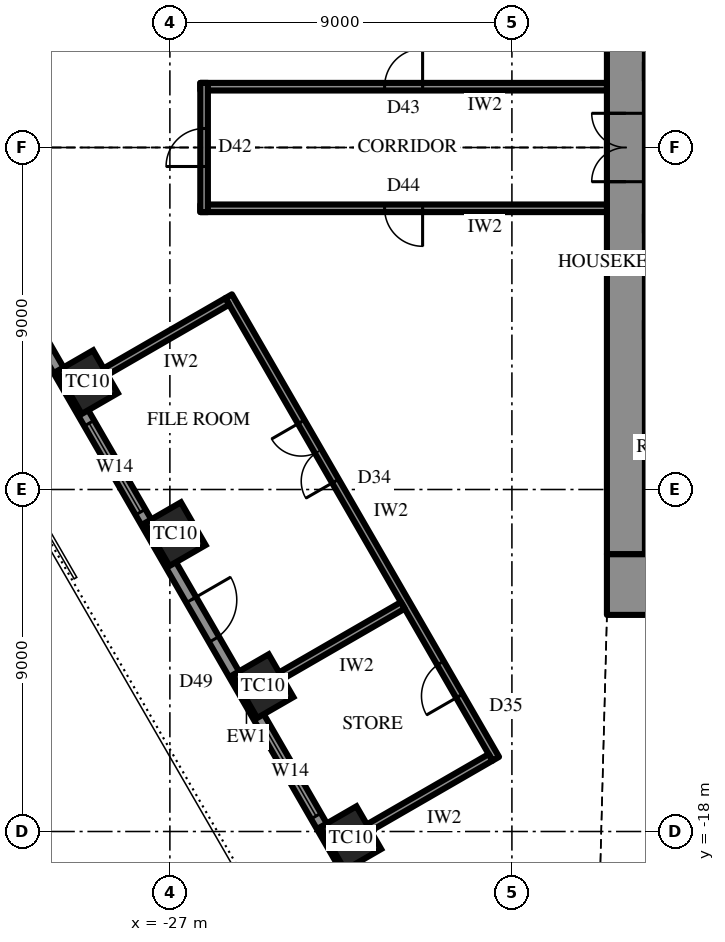
"""IFC4 building model, lengths in metres.
Left out: names, types, materials, properties, quantities, classifications, styles, units other than length and angle.
Written with IfcOpenShell. Run it as: python <this file> out.ifc"""

import sys

from ifc_helpers import new_model, si_unit, direction, frame, frame_2d, origin, origin_2d, place, context, subcontext, project, spatial, rectangle, extrude, element, fill, save


model = new_model("IFC4")
c1 = context("Model", 3, precision=1e-05, world=origin(), true_north=direction((0.0, 1.0)))
c2 = subcontext(c1, "Body", "Model", "MODEL_VIEW")
j1 = project(units=[si_unit("LENGTHUNIT", "METRE"), si_unit("PLANEANGLEUNIT", "RADIAN")], contexts=[c1])
p1 = place(None, origin())
s1 = spatial("IfcSite", under=j1, at=p1, CompositionType="ELEMENT")
p2 = place(p1, origin())
s2 = spatial("IfcBuilding", under=s1, at=p2, CompositionType="ELEMENT")
p3 = place(p2, frame((0.0, 0.0, 244.9)))
s3 = spatial("IfcBuildingStorey", under=s2, at=p3, CompositionType="ELEMENT", Elevation=244.9)
for number, where, z_axis, x_axis in (
    (1, (-29.171, -6.175, 0.0), (0.0, 0.0, 1.0), (0.5, -0.866, 0.0)),
    (2, (-26.861, -10.175, 0.0), (0.0, 0.0, 1.0), (0.5, -0.866, 0.0)),
    (3, (-24.552, -14.175, 0.0), (0.0, 0.0, 1.0), (0.5, -0.866, 0.0)),
    (4, (-22.242, -18.175, 0.0), (0.0, 0.0, 1.0), (0.5, -0.866, 0.0)),
):
    element("IfcColumn", number, at=place(p3, frame(where, z_axis=z_axis, x_axis=x_axis)), inside=s3, PredefinedType="COLUMN", context=c2, shape_type="SweptSolid", body=[
        extrude(rectangle(XDim=1.3, YDim=1.1, at=origin_2d()), origin(), (0.0, 0.0, 1.0), 4.2),
    ])
p4 = place(p3, frame((15.5, -11.5, 0.0), z_axis=(0.0, 0.0, 1.0), x_axis=(-1.0, 0.0, 0.0)))
e5 = element("IfcWall", 5, at=p4, inside=s3, PredefinedType="SHEAR", context=c2, shape_type="SweptSolid", body=[
    extrude(rectangle(XDim=31.0, YDim=1.6, at=frame_2d((15.5, 0.0))), origin(), (0.0, 0.0, 1.0), 4.2),
])
p5 = place(p4, frame((16.35, 0.0, 0.0)))
e6 = element("IfcOpeningElement", 6, at=p5, cuts=e5, PredefinedType="OPENING", context=c2, shape_type="SweptSolid", body=[
    extrude(rectangle(XDim=0.9, YDim=2.2, at=frame_2d((0.45, 1.1))), frame((0.0, 0.81, 0.0), z_axis=(0.0, -1.0, 0.0), x_axis=(1.0, 0.0, 0.0)), (0.0, 0.0, 1.0), 1.62),
])
p6 = place(p4, frame((19.35, 0.0, 0.0)))
e7 = element("IfcOpeningElement", 7, at=p6, cuts=e5, PredefinedType="OPENING", context=c2, shape_type="SweptSolid", body=[
    extrude(rectangle(XDim=0.9, YDim=2.2, at=frame_2d((0.45, 1.1))), frame((0.0, 0.81, 0.0), z_axis=(0.0, -1.0, 0.0), x_axis=(1.0, 0.0, 0.0)), (0.0, 0.0, 1.0), 1.62),
])
p7 = place(p4, frame((22.4, 0.0, 0.0)))
e8 = element("IfcOpeningElement", 8, at=p7, cuts=e5, PredefinedType="OPENING", context=c2, shape_type="SweptSolid", body=[
    extrude(rectangle(XDim=1.0, YDim=2.2, at=frame_2d((0.5, 1.1))), frame((0.0, 0.81, 0.0), z_axis=(0.0, -1.0, 0.0), x_axis=(1.0, 0.0, 0.0)), (0.0, 0.0, 1.0), 1.62),
])
p8 = place(p4, frame((1.65, 0.0, 0.0)))
e9 = element("IfcOpeningElement", 9, at=p8, cuts=e5, PredefinedType="OPENING", context=c2, shape_type="SweptSolid", body=[
    extrude(rectangle(XDim=0.9, YDim=2.2, at=frame_2d((0.45, 1.1))), frame((0.0, 0.81, 0.0), z_axis=(0.0, -1.0, 0.0), x_axis=(1.0, 0.0, 0.0)), (0.0, 0.0, 1.0), 1.62),
])
p9 = place(p4, frame((4.65, 0.0, 0.0)))
e10 = element("IfcOpeningElement", 10, at=p9, cuts=e5, PredefinedType="OPENING", context=c2, shape_type="SweptSolid", body=[
    extrude(rectangle(XDim=0.9, YDim=2.2, at=frame_2d((0.45, 1.1))), frame((0.0, 0.81, 0.0), z_axis=(0.0, -1.0, 0.0), x_axis=(1.0, 0.0, 0.0)), (0.0, 0.0, 1.0), 1.62),
])
p10 = place(p4, frame((25.45, 0.0, 0.0)))
e11 = element("IfcOpeningElement", 11, at=p10, cuts=e5, PredefinedType="OPENING", context=c2, shape_type="SweptSolid", body=[
    extrude(rectangle(XDim=0.9, YDim=2.2, at=frame_2d((0.45, 1.1))), frame((0.0, 0.81, 0.0), z_axis=(0.0, -1.0, 0.0), x_axis=(1.0, 0.0, 0.0)), (0.0, 0.0, 1.0), 1.62),
])
p11 = place(p4, frame((28.45, 0.0, 0.0)))
e12 = element("IfcOpeningElement", 12, at=p11, cuts=e5, PredefinedType="OPENING", context=c2, shape_type="SweptSolid", body=[
    extrude(rectangle(XDim=0.9, YDim=2.2, at=frame_2d((0.45, 1.1))), frame((0.0, 0.81, 0.0), z_axis=(0.0, -1.0, 0.0), x_axis=(1.0, 0.0, 0.0)), (0.0, 0.0, 1.0), 1.62),
])
p12 = place(p3, frame((-15.0, 10.7, 0.0), z_axis=(0.0, 0.0, 1.0), x_axis=(0.0, -1.0, 0.0)))
e13 = element("IfcWall", 13, at=p12, inside=s3, PredefinedType="SHEAR", context=c2, shape_type="SweptSolid", body=[
    extrude(rectangle(XDim=21.4, YDim=1.0, at=frame_2d((10.7, 0.0))), origin(), (0.0, 0.0, 1.0), 4.2),
])
p13 = place(p12, frame((9.8, 0.0, 0.0)))
e14 = element("IfcOpeningElement", 14, at=p13, cuts=e13, PredefinedType="OPENING", context=c2, shape_type="SweptSolid", body=[
    extrude(rectangle(XDim=1.8, YDim=2.4, at=frame_2d((0.9, 1.2))), frame((0.0, 0.51, 0.0), z_axis=(0.0, -1.0, 0.0), x_axis=(1.0, 0.0, 0.0)), (0.0, 0.0, 1.0), 1.02),
])
p14 = place(p3, frame((-12.3, -2.0, 0.0), z_axis=(0.0, 0.0, 1.0), x_axis=(-1.0, 0.0, 0.0)))
e15 = element("IfcWall", 15, at=p14, inside=s3, PredefinedType="SHEAR", context=c2, shape_type="SweptSolid", body=[
    extrude(rectangle(XDim=2.2, YDim=0.5, at=frame_2d((1.1, 0.0))), origin(), (0.0, 0.0, 1.0), 4.2),
])
p15 = place(p14, frame((0.8, 0.0, 0.0)))
e16 = element("IfcOpeningElement", 16, at=p15, cuts=e15, PredefinedType="OPENING", context=c2, shape_type="SweptSolid", body=[
    extrude(rectangle(XDim=0.9, YDim=2.2, at=frame_2d((0.45, 1.1))), frame((0.0, 0.26, 0.0), z_axis=(0.0, -1.0, 0.0), x_axis=(1.0, 0.0, 0.0)), (0.0, 0.0, 1.0), 0.52),
])
p16 = place(p3, frame((-12.3, -4.8, 0.0), z_axis=(0.0, 0.0, 1.0), x_axis=(-1.0, 0.0, 0.0)))
e17 = element("IfcWall", 17, at=p16, inside=s3, PredefinedType="SHEAR", context=c2, shape_type="SweptSolid", body=[
    extrude(rectangle(XDim=2.2, YDim=0.5, at=frame_2d((1.1, 0.0))), origin(), (0.0, 0.0, 1.0), 4.2),
])
p17 = place(p3, frame((-31.263, -3.551, 0.0), z_axis=(0.0, 0.0, 1.0), x_axis=(0.500000442367, -0.866025148383, 0.0)))
e18 = element("IfcWall", 18, at=p17, inside=s3, PredefinedType="SOLIDWALL", context=c2, shape_type="SweptSolid", body=[
    extrude(rectangle(XDim=25.113, YDim=0.3, at=frame_2d((12.556, 0.0))), origin(), (0.0, 0.0, 1.0), 2.8),
])
p18 = place(p17, frame((4.278, 0.0, 0.6)))
e19 = element("IfcOpeningElement", 19, at=p18, cuts=e18, PredefinedType="OPENING", context=c2, shape_type="SweptSolid", body=[
    extrude(rectangle(XDim=2.7, YDim=1.95, at=frame_2d((1.35, 0.975))), frame((0.0, 0.16, 0.0), z_axis=(0.0, -1.0, 0.0), x_axis=(1.0, 0.0, 0.0)), (0.0, 0.0, 1.0), 0.32),
])
p19 = place(p17, frame((9.647, 0.0, 0.0)))
e20 = element("IfcOpeningElement", 20, at=p19, cuts=e18, PredefinedType="OPENING", context=c2, shape_type="SweptSolid", body=[
    extrude(rectangle(XDim=1.2, YDim=2.4, at=frame_2d((0.6, 1.2))), frame((0.0, 0.16, 0.0), z_axis=(0.0, -1.0, 0.0), x_axis=(1.0, 0.0, 0.0)), (0.0, 0.0, 1.0), 0.32),
])
p20 = place(p17, frame((13.516, 0.0, 0.6)))
e21 = element("IfcOpeningElement", 21, at=p20, cuts=e18, PredefinedType="OPENING", context=c2, shape_type="SweptSolid", body=[
    extrude(rectangle(XDim=2.7, YDim=1.95, at=frame_2d((1.35, 0.975))), frame((0.0, 0.16, 0.0), z_axis=(0.0, -1.0, 0.0), x_axis=(1.0, 0.0, 0.0)), (0.0, 0.0, 1.0), 0.32),
])
p21 = place(p17, frame((18.135, 0.0, 0.6)))
e22 = element("IfcOpeningElement", 22, at=p21, cuts=e18, PredefinedType="OPENING", context=c2, shape_type="SweptSolid", body=[
    extrude(rectangle(XDim=2.7, YDim=1.95, at=frame_2d((1.35, 0.975))), frame((0.0, 0.16, 0.0), z_axis=(0.0, -1.0, 0.0), x_axis=(1.0, 0.0, 0.0)), (0.0, 0.0, 1.0), 0.32),
])
p22 = place(p3, frame((-25.453, -3.913, 0.0), z_axis=(0.0, 0.0, 1.0), x_axis=(0.499989069193, -0.866031714597, 0.0)))
e23 = element("IfcWall", 23, at=p22, inside=s3, PredefinedType="PARTITIONING", context=c2, shape_type="SweptSolid", body=[
    extrude(rectangle(XDim=14.056, YDim=0.2, at=frame_2d((7.028, 0.0))), origin(), (0.0, 0.0, 1.0), 4.0),
])
p23 = place(p22, frame((3.819, 0.0, 0.0)))
e24 = element("IfcOpeningElement", 24, at=p23, cuts=e23, PredefinedType="OPENING", context=c2, shape_type="SweptSolid", body=[
    extrude(rectangle(XDim=1.8, YDim=2.4, at=frame_2d((0.9, 1.2))), frame((0.0, 0.11, 0.0), z_axis=(0.0, -1.0, 0.0), x_axis=(1.0, 0.0, 0.0)), (0.0, 0.0, 1.0), 0.22),
])
p24 = place(p22, frame((11.147, 0.0, 0.0)))
e25 = element("IfcOpeningElement", 25, at=p24, cuts=e23, PredefinedType="OPENING", context=c2, shape_type="SweptSolid", body=[
    extrude(rectangle(XDim=1.0, YDim=2.2, at=frame_2d((0.5, 1.1))), frame((0.0, 0.11, 0.0), z_axis=(0.0, -1.0, 0.0), x_axis=(1.0, 0.0, 0.0)), (0.0, 0.0, 1.0), 0.22),
])
for number, where, z_axis, x_axis in (
    (26, (-25.49, -4.05, 0.0), (0.0, 0.0, 1.0), (-0.866, -0.5, 0.0)),
    (27, (-20.871, -12.05, 0.0), (0.0, 0.0, 1.0), (-0.866, -0.5, 0.0)),
    (28, (-18.562, -16.05, 0.0), (0.0, 0.0, 1.0), (-0.866, -0.5, 0.0)),
):
    element("IfcWall", number, at=place(p3, frame(where, z_axis=z_axis, x_axis=x_axis)), inside=s3, PredefinedType="PARTITIONING", context=c2, shape_type="SweptSolid", body=[
        extrude(rectangle(XDim=3.7, YDim=0.2, at=frame_2d((1.85, 0.0))), origin(), (0.0, 0.0, 1.0), 3.082),
    ])
p25 = place(p3, frame((-15.5, 1.6, 0.0), z_axis=(0.0, 0.0, 1.0), x_axis=(-1.0, 0.0, 0.0)))
e29 = element("IfcWall", 29, at=p25, inside=s3, PredefinedType="PARTITIONING", context=c2, shape_type="SweptSolid", body=[
    extrude(rectangle(XDim=10.7, YDim=0.2, at=frame_2d((5.35, 0.0))), origin(), (0.0, 0.0, 1.0), 4.0),
])
p26 = place(p25, frame((4.85, 0.0, 0.0)))
e30 = element("IfcOpeningElement", 30, at=p26, cuts=e29, PredefinedType="OPENING", context=c2, shape_type="SweptSolid", body=[
    extrude(rectangle(XDim=1.0, YDim=2.2, at=frame_2d((0.5, 1.1))), frame((0.0, 0.11, 0.0), z_axis=(0.0, -1.0, 0.0), x_axis=(1.0, 0.0, 0.0)), (0.0, 0.0, 1.0), 0.22),
])
p27 = place(p3, frame((-15.5, -1.6, 0.0), z_axis=(0.0, 0.0, 1.0), x_axis=(-1.0, 0.0, 0.0)))
e31 = element("IfcWall", 31, at=p27, inside=s3, PredefinedType="PARTITIONING", context=c2, shape_type="SweptSolid", body=[
    extrude(rectangle(XDim=10.7, YDim=0.2, at=frame_2d((5.35, 0.0))), origin(), (0.0, 0.0, 1.0), 4.0),
])
p28 = place(p27, frame((4.85, 0.0, 0.0)))
e32 = element("IfcOpeningElement", 32, at=p28, cuts=e31, PredefinedType="OPENING", context=c2, shape_type="SweptSolid", body=[
    extrude(rectangle(XDim=1.0, YDim=2.2, at=frame_2d((0.5, 1.1))), frame((0.0, 0.11, 0.0), z_axis=(0.0, -1.0, 0.0), x_axis=(1.0, 0.0, 0.0)), (0.0, 0.0, 1.0), 0.22),
])
p29 = place(p3, frame((-26.1, -1.7, 0.0), z_axis=(0.0, 0.0, 1.0), x_axis=(0.0, 1.0, 0.0)))
e33 = element("IfcWall", 33, at=p29, inside=s3, PredefinedType="PARTITIONING", context=c2, shape_type="SweptSolid", body=[
    extrude(rectangle(XDim=3.4, YDim=0.2, at=frame_2d((1.7, 0.0))), origin(), (0.0, 0.0, 1.0), 4.0),
])
p30 = place(p29, frame((1.2, 0.0, 0.0)))
e34 = element("IfcOpeningElement", 34, at=p30, cuts=e33, PredefinedType="OPENING", context=c2, shape_type="SweptSolid", body=[
    extrude(rectangle(XDim=1.0, YDim=2.2, at=frame_2d((0.5, 1.1))), frame((0.0, 0.11, 0.0), z_axis=(0.0, -1.0, 0.0), x_axis=(1.0, 0.0, 0.0)), (0.0, 0.0, 1.0), 0.22),
])
p31 = place(p18, origin())
e35 = element("IfcWindow", 35, at=p31, inside=s3, PartitioningType="SINGLE_PANEL", PredefinedType="WINDOW", context=c2, shape_type="SweptSolid", body=[
    extrude(rectangle(XDim=2.7, YDim=1.95, at=frame_2d((1.35, 0.975))), frame((0.0, 0.03, 0.0), z_axis=(0.0, -1.0, 0.0), x_axis=(1.0, 0.0, 0.0)), (0.0, 0.0, 1.0), 0.06),
])
fill(e19, e35)
p32 = place(p19, origin())
e36 = element("IfcDoor", 36, at=p32, inside=s3, OperationType="SINGLE_SWING_RIGHT", PredefinedType="DOOR", context=c2, shape_type="SweptSolid", body=[
    extrude(rectangle(XDim=1.2, YDim=2.4, at=frame_2d((0.6, 1.2))), frame((0.0, 0.025, 0.0), z_axis=(0.0, -1.0, 0.0), x_axis=(1.0, 0.0, 0.0)), (0.0, 0.0, 1.0), 0.05),
])
fill(e20, e36)
p33 = place(p20, origin())
e37 = element("IfcWindow", 37, at=p33, inside=s3, PartitioningType="SINGLE_PANEL", PredefinedType="WINDOW", context=c2, shape_type="SweptSolid", body=[
    extrude(rectangle(XDim=2.7, YDim=1.95, at=frame_2d((1.35, 0.975))), frame((0.0, 0.03, 0.0), z_axis=(0.0, -1.0, 0.0), x_axis=(1.0, 0.0, 0.0)), (0.0, 0.0, 1.0), 0.06),
])
fill(e21, e37)
p34 = place(p13, frame((1.8, 0.0, 0.0), z_axis=(0.0, 0.0, 1.0), x_axis=(-1.0, 0.0, 0.0)))
e38 = element("IfcDoor", 38, at=p34, inside=s3, OperationType="DOUBLE_DOOR_SINGLE_SWING", PredefinedType="DOOR", context=c2, shape_type="SweptSolid", body=[
    extrude(rectangle(XDim=1.8, YDim=2.4, at=frame_2d((0.9, 1.2))), frame((0.0, 0.025, 0.0), z_axis=(0.0, -1.0, 0.0), x_axis=(1.0, 0.0, 0.0)), (0.0, 0.0, 1.0), 0.05),
])
fill(e14, e38)
p35 = place(p23, frame((1.8, 0.0, 0.0), z_axis=(0.0, 0.0, 1.0), x_axis=(-1.0, 0.0, 0.0)))
e39 = element("IfcDoor", 39, at=p35, inside=s3, OperationType="DOUBLE_DOOR_SINGLE_SWING", PredefinedType="DOOR", context=c2, shape_type="SweptSolid", body=[
    extrude(rectangle(XDim=1.8, YDim=2.4, at=frame_2d((0.9, 1.2))), frame((0.0, 0.025, 0.0), z_axis=(0.0, -1.0, 0.0), x_axis=(1.0, 0.0, 0.0)), (0.0, 0.0, 1.0), 0.05),
])
fill(e24, e39)
p36 = place(p24, frame((1.0, 0.0, 0.0), z_axis=(0.0, 0.0, 1.0), x_axis=(-1.0, 0.0, 0.0)))
e40 = element("IfcDoor", 40, at=p36, inside=s3, OperationType="SINGLE_SWING_RIGHT", PredefinedType="DOOR", context=c2, shape_type="SweptSolid", body=[
    extrude(rectangle(XDim=1.0, YDim=2.2, at=frame_2d((0.5, 1.1))), frame((0.0, 0.025, 0.0), z_axis=(0.0, -1.0, 0.0), x_axis=(1.0, 0.0, 0.0)), (0.0, 0.0, 1.0), 0.05),
])
fill(e25, e40)
p37 = place(p26, frame((1.0, 0.0, 0.0), z_axis=(0.0, 0.0, 1.0), x_axis=(-1.0, 0.0, 0.0)))
e41 = element("IfcDoor", 41, at=p37, inside=s3, OperationType="SINGLE_SWING_LEFT", PredefinedType="DOOR", context=c2, shape_type="SweptSolid", body=[
    extrude(rectangle(XDim=1.0, YDim=2.2, at=frame_2d((0.5, 1.1))), frame((0.0, 0.025, 0.0), z_axis=(0.0, -1.0, 0.0), x_axis=(1.0, 0.0, 0.0)), (0.0, 0.0, 1.0), 0.05),
])
fill(e30, e41)
p38 = place(p28, origin())
e42 = element("IfcDoor", 42, at=p38, inside=s3, OperationType="SINGLE_SWING_RIGHT", PredefinedType="DOOR", context=c2, shape_type="SweptSolid", body=[
    extrude(rectangle(XDim=1.0, YDim=2.2, at=frame_2d((0.5, 1.1))), frame((0.0, 0.025, 0.0), z_axis=(0.0, -1.0, 0.0), x_axis=(1.0, 0.0, 0.0)), (0.0, 0.0, 1.0), 0.05),
])
fill(e32, e42)
p39 = place(p30, origin())
e43 = element("IfcDoor", 43, at=p39, inside=s3, OperationType="SINGLE_SWING_RIGHT", PredefinedType="DOOR", context=c2, shape_type="SweptSolid", body=[
    extrude(rectangle(XDim=1.0, YDim=2.2, at=frame_2d((0.5, 1.1))), frame((0.0, 0.025, 0.0), z_axis=(0.0, -1.0, 0.0), x_axis=(1.0, 0.0, 0.0)), (0.0, 0.0, 1.0), 0.05),
])
fill(e34, e43)
save(model, sys.argv[1])
